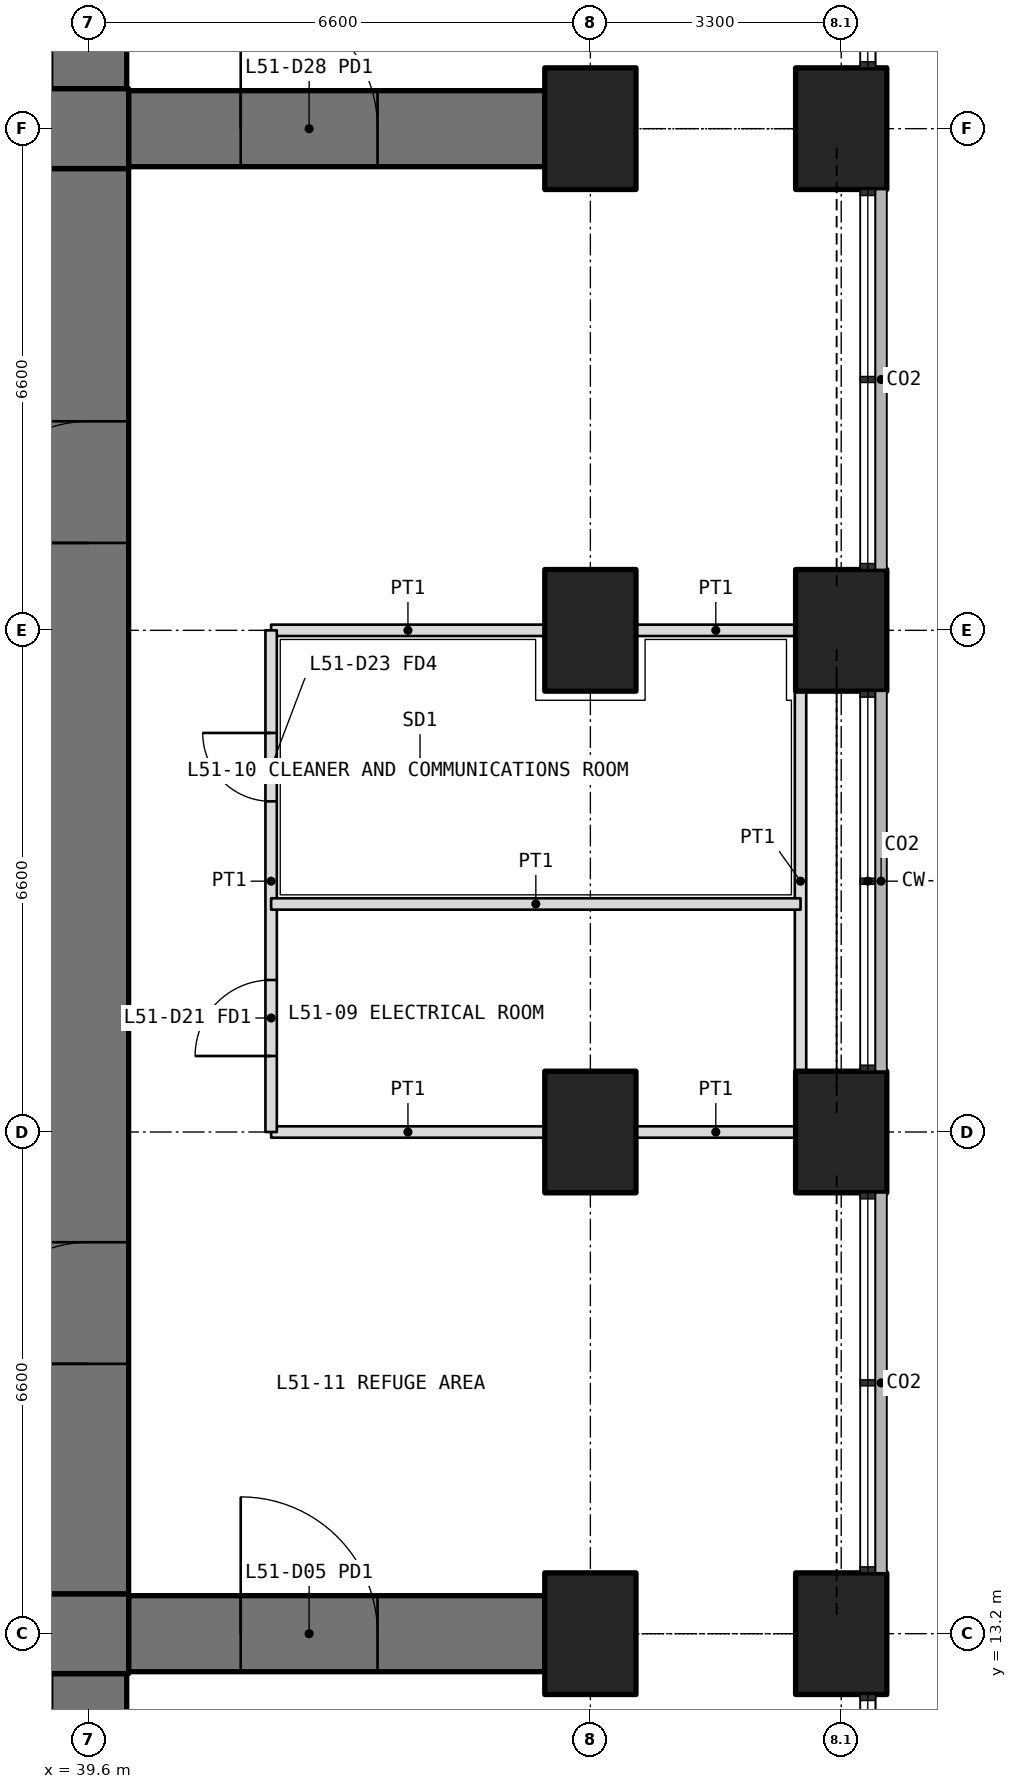
"""IFC4 building model, lengths in metres.
Left out: names, types, materials, properties, quantities, classifications, styles, units other than length and angle.
Written with IfcOpenShell. Run it as: python <this file> out.ifc"""

import sys

from ifc_helpers import new_model, si_unit, direction, frame, frame_2d, origin, origin_2d, place, context, subcontext, project, spatial, rectangle, extrude, element, fill, save


model = new_model("IFC4")
c1 = context("Model", 3, precision=1e-05, world=origin(), true_north=direction((0.0, 1.0)))
c2 = subcontext(c1, "Body", "Model", "MODEL_VIEW")
j1 = project(units=[si_unit("LENGTHUNIT", "METRE"), si_unit("PLANEANGLEUNIT", "RADIAN")], contexts=[c1])
p1 = place(None, origin())
s1 = spatial("IfcSite", under=j1, at=p1, CompositionType="ELEMENT")
p2 = place(p1, origin())
s2 = spatial("IfcBuilding", under=s1, at=p2, CompositionType="ELEMENT")
p3 = place(p2, frame((0.0, 0.0, 222.9)))
s3 = spatial("IfcBuildingStorey", under=s2, at=p3, CompositionType="ELEMENT", Elevation=222.9)
for number, where, z_axis, x_axis in (
    (1, (49.5, 13.2, 0.0), (0.0, 0.0, 1.0), (0.0, 1.0, 0.0)),
    (2, (49.5, 19.8, 0.0), (0.0, 0.0, 1.0), (0.0, 1.0, 0.0)),
    (3, (49.5, 26.4, 0.0), (0.0, 0.0, 1.0), (0.0, 1.0, 0.0)),
    (4, (49.5, 33.0, 0.0), (0.0, 0.0, 1.0), (0.0, 1.0, 0.0)),
    (5, (46.2, 13.2, 0.0), (0.0, 0.0, 1.0), (0.0, 1.0, 0.0)),
    (6, (46.2, 19.8, 0.0), (0.0, 0.0, 1.0), (0.0, 1.0, 0.0)),
    (7, (46.2, 26.4, 0.0), (0.0, 0.0, 1.0), (0.0, 1.0, 0.0)),
    (8, (46.2, 33.0, 0.0), (0.0, 0.0, 1.0), (0.0, 1.0, 0.0)),
):
    element("IfcColumn", number, at=place(p3, frame(where, z_axis=z_axis, x_axis=x_axis)), inside=s3, PredefinedType="COLUMN", context=c2, shape_type="SweptSolid", body=[
        extrude(rectangle(XDim=1.6, YDim=1.2, at=origin_2d()), origin(), (0.0, 0.0, 1.0), 6.3),
    ])
p4 = place(p3, frame((39.6, 12.675, 0.0), z_axis=(0.0, 0.0, 1.0), x_axis=(0.0, -1.0, 0.0)))
e9 = element("IfcWall", 9, at=p4, inside=s3, PredefinedType="SHEAR", context=c2, shape_type="SweptSolid", body=[
    extrude(rectangle(XDim=8.775, YDim=1.0, at=frame_2d((4.388, 0.0))), origin(), (0.0, 0.0, 1.0), 6.0),
])
p5 = place(p4, frame((1.475, 0.0, 0.0)))
e10 = element("IfcOpeningElement", 10, at=p5, cuts=e9, PredefinedType="OPENING", context=c2, shape_type="SweptSolid", body=[
    extrude(rectangle(XDim=1.8, YDim=2.4, at=frame_2d((0.9, 1.2))), frame((0.0, 0.51, 0.0), z_axis=(0.0, -1.0, 0.0), x_axis=(1.0, 0.0, 0.0)), (0.0, 0.0, 1.0), 1.02),
])
p6 = place(p3, frame((39.6, 33.525, 0.0), z_axis=(0.0, 0.0, 1.0), x_axis=(0.0, 1.0, 0.0)))
e11 = element("IfcWall", 11, at=p6, inside=s3, PredefinedType="SHEAR", context=c2, shape_type="SweptSolid", body=[
    extrude(rectangle(XDim=8.775, YDim=1.0, at=frame_2d((4.388, 0.0))), origin(), (0.0, 0.0, 1.0), 6.0),
])
p7 = place(p6, frame((1.475, 0.0, 0.0)))
e12 = element("IfcOpeningElement", 12, at=p7, cuts=e11, PredefinedType="OPENING", context=c2, shape_type="SweptSolid", body=[
    extrude(rectangle(XDim=1.8, YDim=2.4, at=frame_2d((0.9, 1.2))), frame((0.0, 0.51, 0.0), z_axis=(0.0, -1.0, 0.0), x_axis=(1.0, 0.0, 0.0)), (0.0, 0.0, 1.0), 1.02),
])
p8 = place(p3, frame((40.125, 13.2, 0.0), z_axis=(0.0, 0.0, 1.0), x_axis=(1.0, 0.0, 0.0)))
e13 = element("IfcWall", 13, at=p8, inside=s3, PredefinedType="SHEAR", context=c2, shape_type="SweptSolid", body=[
    extrude(rectangle(XDim=5.475, YDim=1.0, at=frame_2d((2.738, 0.0))), origin(), (0.0, 0.0, 1.0), 6.0),
])
p9 = place(p8, frame((1.475, 0.0, 0.0)))
e14 = element("IfcOpeningElement", 14, at=p9, cuts=e13, PredefinedType="OPENING", context=c2, shape_type="SweptSolid", body=[
    extrude(rectangle(XDim=1.8, YDim=2.4, at=frame_2d((0.9, 1.2))), frame((0.0, 0.51, 0.0), z_axis=(0.0, -1.0, 0.0), x_axis=(1.0, 0.0, 0.0)), (0.0, 0.0, 1.0), 1.02),
])
p10 = place(p3, frame((40.125, 33.0, 0.0), z_axis=(0.0, 0.0, 1.0), x_axis=(1.0, 0.0, 0.0)))
e15 = element("IfcWall", 15, at=p10, inside=s3, PredefinedType="SHEAR", context=c2, shape_type="SweptSolid", body=[
    extrude(rectangle(XDim=5.475, YDim=1.0, at=frame_2d((2.738, 0.0))), origin(), (0.0, 0.0, 1.0), 6.0),
])
p11 = place(p10, frame((1.475, 0.0, 0.0)))
e16 = element("IfcOpeningElement", 16, at=p11, cuts=e15, PredefinedType="OPENING", context=c2, shape_type="SweptSolid", body=[
    extrude(rectangle(XDim=1.8, YDim=2.4, at=frame_2d((0.9, 1.2))), frame((0.0, 0.51, 0.0), z_axis=(0.0, -1.0, 0.0), x_axis=(1.0, 0.0, 0.0)), (0.0, 0.0, 1.0), 1.02),
])
p12 = place(p3, frame((12.675, 13.2, 0.0), z_axis=(0.0, 0.0, 1.0), x_axis=(1.0, 0.0, 0.0)))
e17 = element("IfcWall", 17, at=p12, inside=s3, PredefinedType="SHEAR", context=c2, shape_type="SweptSolid", body=[
    extrude(rectangle(XDim=27.45, YDim=1.05, at=frame_2d((13.725, 0.0))), origin(), (0.0, 0.0, 1.0), 6.3),
])
p13 = place(p3, frame((39.6, 13.725, 0.0), z_axis=(0.0, 0.0, 1.0), x_axis=(0.0, 1.0, 0.0)))
e18 = element("IfcWall", 18, at=p13, inside=s3, PredefinedType="SHEAR", context=c2, shape_type="SweptSolid", body=[
    extrude(rectangle(XDim=18.75, YDim=1.05, at=frame_2d((9.375, 0.0))), origin(), (0.0, 0.0, 1.0), 6.3),
])
p14 = place(p13, frame((3.025, 0.0, 0.0)))
e19 = element("IfcOpeningElement", 19, at=p14, cuts=e18, PredefinedType="OPENING", context=c2, shape_type="SweptSolid", body=[
    extrude(rectangle(XDim=1.6, YDim=2.1, at=frame_2d((0.8, 1.05))), frame((0.0, 0.535, 0.0), z_axis=(0.0, -1.0, 0.0), x_axis=(1.0, 0.0, 0.0)), (0.0, 0.0, 1.0), 1.07),
])
p15 = place(p13, frame((13.825, 0.0, 0.0)))
e20 = element("IfcOpeningElement", 20, at=p15, cuts=e18, PredefinedType="OPENING", context=c2, shape_type="SweptSolid", body=[
    extrude(rectangle(XDim=1.6, YDim=2.1, at=frame_2d((0.8, 1.05))), frame((0.0, 0.535, 0.0), z_axis=(0.0, -1.0, 0.0), x_axis=(1.0, 0.0, 0.0)), (0.0, 0.0, 1.0), 1.07),
])
p16 = place(p3, frame((40.125, 33.0, 0.0), z_axis=(0.0, 0.0, 1.0), x_axis=(-1.0, 0.0, 0.0)))
e21 = element("IfcWall", 21, at=p16, inside=s3, PredefinedType="SHEAR", context=c2, shape_type="SweptSolid", body=[
    extrude(rectangle(XDim=27.45, YDim=1.05, at=frame_2d((13.725, 0.0))), origin(), (0.0, 0.0, 1.0), 6.3),
])
p17 = place(p3, frame((48.9, 19.8, 0.0), z_axis=(0.0, 0.0, 1.0), x_axis=(-1.0, 0.0, 0.0)))
e22 = element("IfcWall", 22, at=p17, inside=s3, PredefinedType="PARTITIONING", context=c2, shape_type="SweptSolid", body=[
    extrude(rectangle(XDim=2.1, YDim=0.15, at=frame_2d((1.05, 0.0))), origin(), (0.0, 0.0, 1.0), 4.0),
])
for number, where, z_axis, x_axis in (
    (23, (45.6, 19.8, 0.0), (0.0, 0.0, 1.0), (-1.0, 0.0, 0.0)),
    (24, (42.0, 26.4, 0.0), (0.0, 0.0, 1.0), (1.0, 0.0, 0.0)),
):
    element("IfcWall", number, at=place(p3, frame(where, z_axis=z_axis, x_axis=x_axis)), inside=s3, PredefinedType="PARTITIONING", context=c2, shape_type="SweptSolid", body=[
        extrude(rectangle(XDim=3.6, YDim=0.15, at=frame_2d((1.8, 0.0))), origin(), (0.0, 0.0, 1.0), 4.0),
    ])
p18 = place(p3, frame((46.8, 26.4, 0.0), z_axis=(0.0, 0.0, 1.0), x_axis=(1.0, 0.0, 0.0)))
e25 = element("IfcWall", 25, at=p18, inside=s3, PredefinedType="PARTITIONING", context=c2, shape_type="SweptSolid", body=[
    extrude(rectangle(XDim=2.1, YDim=0.15, at=frame_2d((1.05, 0.0))), origin(), (0.0, 0.0, 1.0), 4.0),
])
p19 = place(p3, frame((42.0, 19.8, 0.0), z_axis=(0.0, 0.0, 1.0), x_axis=(0.0, 1.0, 0.0)))
e26 = element("IfcWall", 26, at=p19, inside=s3, PredefinedType="PARTITIONING", context=c2, shape_type="SweptSolid", body=[
    extrude(rectangle(XDim=6.6, YDim=0.15, at=frame_2d((3.3, 0.0))), origin(), (0.0, 0.0, 1.0), 4.0),
])
p20 = place(p19, frame((1.0, 0.0, 0.0)))
e27 = element("IfcOpeningElement", 27, at=p20, cuts=e26, PredefinedType="OPENING", context=c2, shape_type="SweptSolid", body=[
    extrude(rectangle(XDim=1.0, YDim=2.1, at=frame_2d((0.5, 1.05))), frame((0.0, 0.085, 0.0), z_axis=(0.0, -1.0, 0.0), x_axis=(1.0, 0.0, 0.0)), (0.0, 0.0, 1.0), 0.17),
])
p21 = place(p19, frame((4.35, 0.0, 0.0)))
e28 = element("IfcOpeningElement", 28, at=p21, cuts=e26, PredefinedType="OPENING", context=c2, shape_type="SweptSolid", body=[
    extrude(rectangle(XDim=0.9, YDim=2.1, at=frame_2d((0.45, 1.05))), frame((0.0, 0.085, 0.0), z_axis=(0.0, -1.0, 0.0), x_axis=(1.0, 0.0, 0.0)), (0.0, 0.0, 1.0), 0.17),
])
p22 = place(p3, frame((48.965, 25.6, 0.0), z_axis=(0.0, 0.0, 1.0), x_axis=(0.0, -1.0, 0.0)))
e29 = element("IfcWall", 29, at=p22, inside=s3, PredefinedType="PARTITIONING", context=c2, shape_type="SweptSolid", body=[
    extrude(rectangle(XDim=5.0, YDim=0.15, at=frame_2d((2.5, 0.0))), origin(), (0.0, 0.0, 1.0), 4.0),
])
p23 = place(p3, frame((42.0, 22.8, 0.0), z_axis=(0.0, 0.0, 1.0), x_axis=(1.0, 0.0, 0.0)))
e30 = element("IfcWall", 30, at=p23, inside=s3, PredefinedType="PARTITIONING", context=c2, shape_type="SweptSolid", body=[
    extrude(rectangle(XDim=6.965, YDim=0.15, at=frame_2d((3.482, 0.0))), origin(), (0.0, 0.0, 1.0), 4.0),
])
p24 = place(p20, origin())
e31 = element("IfcDoor", 31, at=p24, inside=s3, OperationType="SINGLE_SWING_LEFT", PredefinedType="DOOR", context=c2, shape_type="SweptSolid", body=[
    extrude(rectangle(XDim=1.0, YDim=2.1, at=frame_2d((0.5, 1.05))), frame((0.0, 0.025, 0.0), z_axis=(0.0, -1.0, 0.0), x_axis=(1.0, 0.0, 0.0)), (0.0, 0.0, 1.0), 0.05),
])
fill(e27, e31)
p25 = place(p21, origin())
e32 = element("IfcDoor", 32, at=p25, inside=s3, OperationType="SINGLE_SWING_RIGHT", PredefinedType="DOOR", context=c2, shape_type="SweptSolid", body=[
    extrude(rectangle(XDim=0.9, YDim=2.1, at=frame_2d((0.45, 1.05))), frame((0.0, 0.025, 0.0), z_axis=(0.0, -1.0, 0.0), x_axis=(1.0, 0.0, 0.0)), (0.0, 0.0, 1.0), 0.05),
])
fill(e28, e32)
p26 = place(p9, origin())
e33 = element("IfcDoor", 33, at=p26, inside=s3, OperationType="DOUBLE_DOOR_SINGLE_SWING", PredefinedType="DOOR", context=c2, shape_type="SweptSolid", body=[
    extrude(rectangle(XDim=1.8, YDim=2.4, at=frame_2d((0.9, 1.2))), frame((0.0, 0.025, 0.0), z_axis=(0.0, -1.0, 0.0), x_axis=(1.0, 0.0, 0.0)), (0.0, 0.0, 1.0), 0.05),
])
fill(e14, e33)
p27 = place(p11, origin())
e34 = element("IfcDoor", 34, at=p27, inside=s3, OperationType="DOUBLE_DOOR_SINGLE_SWING", PredefinedType="DOOR", context=c2, shape_type="SweptSolid", body=[
    extrude(rectangle(XDim=1.8, YDim=2.4, at=frame_2d((0.9, 1.2))), frame((0.0, 0.025, 0.0), z_axis=(0.0, -1.0, 0.0), x_axis=(1.0, 0.0, 0.0)), (0.0, 0.0, 1.0), 0.05),
])
fill(e16, e34)
p28 = place(p14, origin())
e35 = element("IfcDoor", 35, at=p28, inside=s3, OperationType="DOUBLE_DOOR_DOUBLE_SWING", PredefinedType="DOOR", context=c2, shape_type="SweptSolid", body=[
    extrude(rectangle(XDim=1.6, YDim=2.1, at=frame_2d((0.8, 1.05))), frame((0.0, 0.025, 0.0), z_axis=(0.0, -1.0, 0.0), x_axis=(1.0, 0.0, 0.0)), (0.0, 0.0, 1.0), 0.05),
])
fill(e19, e35)
p29 = place(p15, origin())
e36 = element("IfcDoor", 36, at=p29, inside=s3, OperationType="DOUBLE_DOOR_DOUBLE_SWING", PredefinedType="DOOR", context=c2, shape_type="SweptSolid", body=[
    extrude(rectangle(XDim=1.6, YDim=2.1, at=frame_2d((0.8, 1.05))), frame((0.0, 0.025, 0.0), z_axis=(0.0, -1.0, 0.0), x_axis=(1.0, 0.0, 0.0)), (0.0, 0.0, 1.0), 0.05),
])
fill(e20, e36)
save(model, sys.argv[1])
